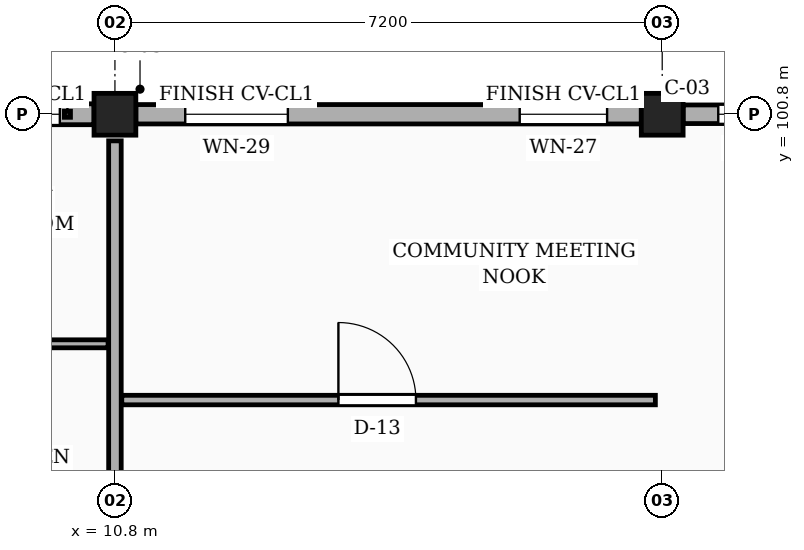
"""IFC4 building model, lengths in metres.
Left out: names, types, materials, properties, quantities, classifications, styles, units other than length and angle.
Written with IfcOpenShell. Run it as: python <this file> out.ifc"""

import sys

from ifc_helpers import new_model, si_unit, direction, frame, frame_2d, origin, origin_2d, place, context, subcontext, project, spatial, rectangle, extrude, element, fill, save


model = new_model("IFC4")
c1 = context("Model", 3, precision=1e-05, world=origin(), true_north=direction((0.0, 1.0)))
c2 = subcontext(c1, "Body", "Model", "MODEL_VIEW")
j1 = project(units=[si_unit("LENGTHUNIT", "METRE"), si_unit("PLANEANGLEUNIT", "RADIAN")], contexts=[c1])
p1 = place(None, origin())
s1 = spatial("IfcSite", under=j1, at=p1, CompositionType="ELEMENT")
p2 = place(p1, origin())
s2 = spatial("IfcBuilding", under=s1, at=p2, CompositionType="ELEMENT")
p3 = place(p2, frame((0.0, 0.0, 13.95)))
s3 = spatial("IfcBuildingStorey", under=s2, at=p3, CompositionType="ELEMENT", Elevation=13.95)
for number, where, z_axis, x_axis in (
    (1, (10.8, 100.8, 0.0), (0.0, 0.0, 1.0), (1.0, 0.0, 0.0)),
    (2, (18.0, 100.8, 0.0), (0.0, 0.0, 1.0), (1.0, 0.0, 0.0)),
):
    element("IfcColumn", number, at=place(p3, frame(where, z_axis=z_axis, x_axis=x_axis)), inside=s3, PredefinedType="COLUMN", context=c2, shape_type="SweptSolid", body=[
        extrude(rectangle(XDim=0.55, YDim=0.55, at=origin_2d()), origin(), (0.0, 0.0, 1.0), 3.15),
    ])
p4 = place(p3, frame((24.925, 100.8, 0.0), z_axis=(0.0, 0.0, 1.0), x_axis=(-1.0, 0.0, 0.0)))
e3 = element("IfcWall", 3, at=p4, inside=s3, PredefinedType="SOLIDWALL", context=c2, shape_type="SweptSolid", body=[
    extrude(rectangle(XDim=6.65, YDim=0.245, at=frame_2d((3.325, 0.0))), origin(), (0.0, 0.0, 1.0), 2.48),
])
p5 = place(p4, frame((0.802, 0.0, 0.78)))
e4 = element("IfcOpeningElement", 4, at=p5, cuts=e3, PredefinedType="OPENING", context=c2, shape_type="SweptSolid", body=[
    extrude(rectangle(XDim=1.46, YDim=1.36, at=frame_2d((0.73, 0.68))), frame((0.0, 0.133, 0.0), z_axis=(0.0, -1.0, 0.0), x_axis=(1.0, 0.0, 0.0)), (0.0, 0.0, 1.0), 0.265),
])
p6 = place(p4, frame((3.35, 0.0, 0.78)))
e5 = element("IfcOpeningElement", 5, at=p6, cuts=e3, PredefinedType="OPENING", context=c2, shape_type="SweptSolid", body=[
    extrude(rectangle(XDim=1.05, YDim=1.44, at=frame_2d((0.525, 0.72))), frame((0.0, 0.133, 0.0), z_axis=(0.0, -1.0, 0.0), x_axis=(1.0, 0.0, 0.0)), (0.0, 0.0, 1.0), 0.265),
])
p7 = place(p4, frame((5.147, 0.0, 0.78)))
e6 = element("IfcOpeningElement", 6, at=p7, cuts=e3, PredefinedType="OPENING", context=c2, shape_type="SweptSolid", body=[
    extrude(rectangle(XDim=1.04, YDim=1.26, at=frame_2d((0.52, 0.63))), frame((0.0, 0.133, 0.0), z_axis=(0.0, -1.0, 0.0), x_axis=(1.0, 0.0, 0.0)), (0.0, 0.0, 1.0), 0.265),
])
p8 = place(p3, frame((17.725, 100.8, 0.0), z_axis=(0.0, 0.0, 1.0), x_axis=(-1.0, 0.0, 0.0)))
e7 = element("IfcWall", 7, at=p8, inside=s3, PredefinedType="SOLIDWALL", context=c2, shape_type="SweptSolid", body=[
    extrude(rectangle(XDim=6.65, YDim=0.255, at=frame_2d((3.325, 0.0))), origin(), (0.0, 0.0, 1.0), 2.48),
])
p9 = place(p8, frame((0.45, 0.0, 0.78)))
e8 = element("IfcOpeningElement", 8, at=p9, cuts=e7, PredefinedType="OPENING", context=c2, shape_type="SweptSolid", body=[
    extrude(rectangle(XDim=1.15, YDim=1.44, at=frame_2d((0.575, 0.72))), frame((0.0, 0.137, 0.0), z_axis=(0.0, -1.0, 0.0), x_axis=(1.0, 0.0, 0.0)), (0.0, 0.0, 1.0), 0.275),
])
p10 = place(p8, frame((4.65, 0.0, 0.78)))
e9 = element("IfcOpeningElement", 9, at=p10, cuts=e7, PredefinedType="OPENING", context=c2, shape_type="SweptSolid", body=[
    extrude(rectangle(XDim=1.35, YDim=1.44, at=frame_2d((0.675, 0.72))), frame((0.0, 0.137, 0.0), z_axis=(0.0, -1.0, 0.0), x_axis=(1.0, 0.0, 0.0)), (0.0, 0.0, 1.0), 0.275),
])
p11 = place(p3, frame((10.525, 100.8, 0.0), z_axis=(0.0, 0.0, 1.0), x_axis=(-1.0, 0.0, 0.0)))
e10 = element("IfcWall", 10, at=p11, inside=s3, PredefinedType="SOLIDWALL", context=c2, shape_type="SweptSolid", body=[
    extrude(rectangle(XDim=6.65, YDim=0.275, at=frame_2d((3.325, 0.0))), origin(), (0.0, 0.0, 1.0), 2.48),
])
p12 = place(p11, frame((0.45, 0.0, 0.78)))
e11 = element("IfcOpeningElement", 11, at=p12, cuts=e10, PredefinedType="OPENING", context=c2, shape_type="SweptSolid", body=[
    extrude(rectangle(XDim=1.35, YDim=1.44, at=frame_2d((0.675, 0.72))), frame((0.0, 0.147, 0.0), z_axis=(0.0, -1.0, 0.0), x_axis=(1.0, 0.0, 0.0)), (0.0, 0.0, 1.0), 0.295),
])
p13 = place(p11, frame((4.65, 0.0, 0.78)))
e12 = element("IfcOpeningElement", 12, at=p13, cuts=e10, PredefinedType="OPENING", context=c2, shape_type="SweptSolid", body=[
    extrude(rectangle(XDim=0.85, YDim=1.15, at=frame_2d((0.425, 0.575))), frame((0.0, 0.147, 0.0), z_axis=(0.0, -1.0, 0.0), x_axis=(1.0, 0.0, 0.0)), (0.0, 0.0, 1.0), 0.295),
])
p14 = place(p3, frame((10.8, 93.95, 0.0), z_axis=(0.0, 0.0, 1.0), x_axis=(0.0, 1.0, 0.0)))
e13 = element("IfcWall", 13, at=p14, inside=s3, PredefinedType="PARTITIONING", context=c2, shape_type="SweptSolid", body=[
    extrude(rectangle(XDim=6.5, YDim=0.165, at=frame_2d((3.25, 0.0))), origin(), (0.0, 0.0, 1.0), 2.345),
])
p15 = place(p14, frame((1.0, 0.0, 0.0)))
e14 = element("IfcOpeningElement", 14, at=p15, cuts=e13, PredefinedType="OPENING", context=c2, shape_type="SweptSolid", body=[
    extrude(rectangle(XDim=1.0, YDim=2.15, at=frame_2d((0.5, 1.075))), frame((0.0, 0.093, 0.0), z_axis=(0.0, -1.0, 0.0), x_axis=(1.0, 0.0, 0.0)), (0.0, 0.0, 1.0), 0.185),
])
p16 = place(p3, frame((10.89, 97.04, 0.0), z_axis=(0.0, 0.0, 1.0), x_axis=(1.0, 0.0, 0.0)))
e15 = element("IfcWall", 15, at=p16, inside=s3, PredefinedType="PARTITIONING", context=c2, shape_type="SweptSolid", body=[
    extrude(rectangle(XDim=7.02, YDim=0.125, at=frame_2d((3.51, 0.0))), origin(), (0.0, 0.0, 1.0), 2.345),
])
p17 = place(p16, frame((2.85, 0.0, 0.0)))
e16 = element("IfcOpeningElement", 16, at=p17, cuts=e15, PredefinedType="OPENING", context=c2, shape_type="SweptSolid", body=[
    extrude(rectangle(XDim=1.02, YDim=2.15, at=frame_2d((0.51, 1.075))), frame((0.0, 0.073, 0.0), z_axis=(0.0, -1.0, 0.0), x_axis=(1.0, 0.0, 0.0)), (0.0, 0.0, 1.0), 0.145),
])
p18 = place(p3, frame((8.29, 97.78, 0.0), z_axis=(0.0, 0.0, 1.0), x_axis=(1.0, 0.0, 0.0)))
e17 = element("IfcWall", 17, at=p18, inside=s3, PredefinedType="PARTITIONING", context=c2, shape_type="SweptSolid", body=[
    extrude(rectangle(XDim=2.42, YDim=0.105, at=frame_2d((1.21, 0.0))), origin(), (0.0, 0.0, 1.0), 2.345),
])
p19 = place(p18, frame((0.76, 0.0, 0.0)))
e18 = element("IfcOpeningElement", 18, at=p19, cuts=e17, PredefinedType="OPENING", context=c2, shape_type="SweptSolid", body=[
    extrude(rectangle(XDim=0.9, YDim=2.05, at=frame_2d((0.45, 1.025))), frame((0.0, 0.062, 0.0), z_axis=(0.0, -1.0, 0.0), x_axis=(1.0, 0.0, 0.0)), (0.0, 0.0, 1.0), 0.125),
])
p20 = place(p7, origin())
e19 = element("IfcWindow", 19, at=p20, inside=s3, PartitioningType="SINGLE_PANEL", PredefinedType="WINDOW", context=c2, shape_type="SweptSolid", body=[
    extrude(rectangle(XDim=1.04, YDim=1.26, at=frame_2d((0.52, 0.63))), frame((0.0, 0.03, 0.0), z_axis=(0.0, -1.0, 0.0), x_axis=(1.0, 0.0, 0.0)), (0.0, 0.0, 1.0), 0.06),
])
fill(e6, e19)
p21 = place(p9, origin())
e20 = element("IfcWindow", 20, at=p21, inside=s3, PartitioningType="SINGLE_PANEL", PredefinedType="WINDOW", context=c2, shape_type="SweptSolid", body=[
    extrude(rectangle(XDim=1.15, YDim=1.44, at=frame_2d((0.575, 0.72))), frame((0.0, 0.03, 0.0), z_axis=(0.0, -1.0, 0.0), x_axis=(1.0, 0.0, 0.0)), (0.0, 0.0, 1.0), 0.06),
])
fill(e8, e20)
p22 = place(p10, origin())
e21 = element("IfcWindow", 21, at=p22, inside=s3, PartitioningType="SINGLE_PANEL", PredefinedType="WINDOW", context=c2, shape_type="SweptSolid", body=[
    extrude(rectangle(XDim=1.35, YDim=1.44, at=frame_2d((0.675, 0.72))), frame((0.0, 0.03, 0.0), z_axis=(0.0, -1.0, 0.0), x_axis=(1.0, 0.0, 0.0)), (0.0, 0.0, 1.0), 0.06),
])
fill(e9, e21)
p23 = place(p12, origin())
e22 = element("IfcWindow", 22, at=p23, inside=s3, PartitioningType="SINGLE_PANEL", PredefinedType="WINDOW", context=c2, shape_type="SweptSolid", body=[
    extrude(rectangle(XDim=1.35, YDim=1.44, at=frame_2d((0.675, 0.72))), frame((0.0, 0.03, 0.0), z_axis=(0.0, -1.0, 0.0), x_axis=(1.0, 0.0, 0.0)), (0.0, 0.0, 1.0), 0.06),
])
fill(e11, e22)
p24 = place(p17, origin())
e23 = element("IfcDoor", 23, at=p24, inside=s3, OperationType="SINGLE_SWING_LEFT", PredefinedType="DOOR", context=c2, shape_type="SweptSolid", body=[
    extrude(rectangle(XDim=1.02, YDim=2.15, at=frame_2d((0.51, 1.075))), frame((0.0, 0.025, 0.0), z_axis=(0.0, -1.0, 0.0), x_axis=(1.0, 0.0, 0.0)), (0.0, 0.0, 1.0), 0.05),
])
fill(e16, e23)
save(model, sys.argv[1])
